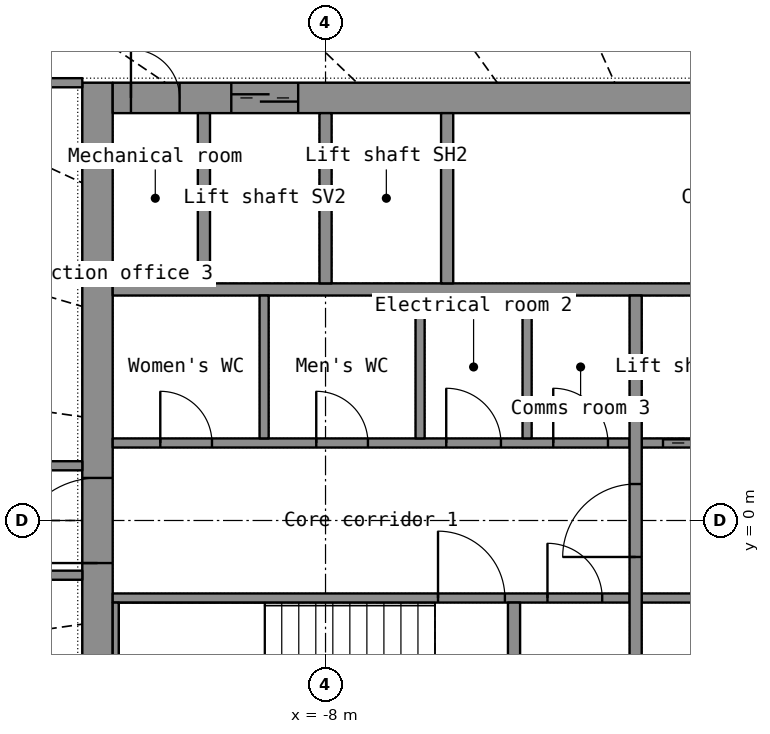
"""IFC4 building model, lengths in metres.
Left out: names, types, materials, properties, quantities, classifications, styles, units other than length and angle.
Written with IfcOpenShell. Run it as: python <this file> out.ifc"""

import sys

from ifc_helpers import new_model, si_unit, direction, frame, frame_2d, origin, place, context, subcontext, project, spatial, rectangle, extrude, element, fill, save


model = new_model("IFC4")
c1 = context("Model", 3, precision=1e-05, world=origin(), true_north=direction((0.0, 1.0)))
c2 = subcontext(c1, "Body", "Model", "MODEL_VIEW")
j1 = project(units=[si_unit("LENGTHUNIT", "METRE"), si_unit("PLANEANGLEUNIT", "RADIAN")], contexts=[c1])
p1 = place(None, origin())
s1 = spatial("IfcSite", under=j1, at=p1, CompositionType="ELEMENT")
p2 = place(p1, origin())
s2 = spatial("IfcBuilding", under=s1, at=p2, CompositionType="ELEMENT")
p3 = place(p2, frame((0.0, 0.0, 137.8)))
s3 = spatial("IfcBuildingStorey", under=s2, at=p3, CompositionType="ELEMENT", Elevation=137.8)
p4 = place(p3, frame((-11.75, -7.2, 0.0), z_axis=(0.0, 0.0, 1.0), x_axis=(0.0, 1.0, 0.0)))
e1 = element("IfcWall", 1, at=p4, inside=s3, PredefinedType="SHEAR", context=c2, shape_type="SweptSolid", body=[
    extrude(rectangle(XDim=14.4, YDim=0.5, at=frame_2d((7.2, 0.0))), origin(), (0.0, 0.0, 1.0), 3.3),
])
p5 = place(p4, frame((6.5, 0.0, 0.0)))
e2 = element("IfcOpeningElement", 2, at=p5, cuts=e1, PredefinedType="OPENING", context=c2, shape_type="SweptSolid", body=[
    extrude(rectangle(XDim=1.4, YDim=2.2, at=frame_2d((0.7, 1.1))), frame((0.0, 0.26, 0.0), z_axis=(0.0, -1.0, 0.0), x_axis=(1.0, 0.0, 0.0)), (0.0, 0.0, 1.0), 0.52),
])
p6 = place(p3, frame((-11.5, 6.95, 0.0), z_axis=(0.0, 0.0, 1.0), x_axis=(1.0, 0.0, 0.0)))
e3 = element("IfcWall", 3, at=p6, inside=s3, PredefinedType="SHEAR", context=c2, shape_type="SweptSolid", body=[
    extrude(rectangle(XDim=23.0, YDim=0.5, at=frame_2d((11.5, 0.0))), origin(), (0.0, 0.0, 1.0), 3.3),
])
p7 = place(p6, frame((1.95, 0.0, 0.0)))
e4 = element("IfcOpeningElement", 4, at=p7, cuts=e3, PredefinedType="OPENING", context=c2, shape_type="SweptSolid", body=[
    extrude(rectangle(XDim=1.1, YDim=2.2, at=frame_2d((0.55, 1.1))), frame((0.0, 0.26, 0.0), z_axis=(0.0, -1.0, 0.0), x_axis=(1.0, 0.0, 0.0)), (0.0, 0.0, 1.0), 0.52),
])
p8 = place(p6, frame((10.05, 0.0, 0.0)))
e5 = element("IfcOpeningElement", 5, at=p8, cuts=e3, PredefinedType="OPENING", context=c2, shape_type="SweptSolid", body=[
    extrude(rectangle(XDim=0.9, YDim=2.1, at=frame_2d((0.45, 1.05))), frame((0.0, 0.26, 0.0), z_axis=(0.0, -1.0, 0.0), x_axis=(1.0, 0.0, 0.0)), (0.0, 0.0, 1.0), 0.52),
])
p9 = place(p6, frame((18.05, 0.0, 0.0)))
e6 = element("IfcOpeningElement", 6, at=p9, cuts=e3, PredefinedType="OPENING", context=c2, shape_type="SweptSolid", body=[
    extrude(rectangle(XDim=0.9, YDim=2.1, at=frame_2d((0.45, 1.05))), frame((0.0, 0.26, 0.0), z_axis=(0.0, -1.0, 0.0), x_axis=(1.0, 0.0, 0.0)), (0.0, 0.0, 1.0), 0.52),
])
p10 = place(p6, frame((0.3, 0.0, 0.0)))
e7 = element("IfcOpeningElement", 7, at=p10, cuts=e3, PredefinedType="OPENING", context=c2, shape_type="SweptSolid", body=[
    extrude(rectangle(XDim=0.8, YDim=2.05, at=frame_2d((0.4, 1.025))), frame((0.0, 0.26, 0.0), z_axis=(0.0, -1.0, 0.0), x_axis=(1.0, 0.0, 0.0)), (0.0, 0.0, 1.0), 0.52),
])
p11 = place(p6, frame((21.9, 0.0, 0.0)))
e8 = element("IfcOpeningElement", 8, at=p11, cuts=e3, PredefinedType="OPENING", context=c2, shape_type="SweptSolid", body=[
    extrude(rectangle(XDim=0.8, YDim=2.05, at=frame_2d((0.4, 1.025))), frame((0.0, 0.26, 0.0), z_axis=(0.0, -1.0, 0.0), x_axis=(1.0, 0.0, 0.0)), (0.0, 0.0, 1.0), 0.52),
])
p12 = place(p3, frame((-11.5, 3.8, 0.0), z_axis=(0.0, 0.0, 1.0), x_axis=(1.0, 0.0, 0.0)))
e9 = element("IfcWall", 9, at=p12, inside=s3, PredefinedType="SHEAR", context=c2, shape_type="SweptSolid", body=[
    extrude(rectangle(XDim=23.0, YDim=0.2, at=frame_2d((11.5, 0.0))), origin(), (0.0, 0.0, 1.0), 3.3),
])
for number, where, z_axis, x_axis in (
    (10, (-10.0, 3.9, 0.0), (0.0, 0.0, 1.0), (0.0, 1.0, 0.0)),
    (11, (-8.0, 3.9, 0.0), (0.0, 0.0, 1.0), (0.0, 1.0, 0.0)),
    (12, (-6.0, 3.9, 0.0), (0.0, 0.0, 1.0), (0.0, 1.0, 0.0)),
):
    element("IfcWall", number, at=place(p3, frame(where, z_axis=z_axis, x_axis=x_axis)), inside=s3, PredefinedType="SHEAR", context=c2, shape_type="SweptSolid", body=[
        extrude(rectangle(XDim=2.8, YDim=0.2, at=frame_2d((1.4, 0.0))), origin(), (0.0, 0.0, 1.0), 3.3),
    ])
p13 = place(p3, frame((-11.5, -1.275, 0.0), z_axis=(0.0, 0.0, 1.0), x_axis=(1.0, 0.0, 0.0)))
e13 = element("IfcWall", 13, at=p13, inside=s3, PredefinedType="SHEAR", context=c2, shape_type="SweptSolid", body=[
    extrude(rectangle(XDim=8.5, YDim=0.15, at=frame_2d((4.25, 0.0))), origin(), (0.0, 0.0, 1.0), 3.3),
])
p14 = place(p13, frame((5.35, 0.0, 0.0)))
e14 = element("IfcOpeningElement", 14, at=p14, cuts=e13, PredefinedType="OPENING", context=c2, shape_type="SweptSolid", body=[
    extrude(rectangle(XDim=1.1, YDim=2.15, at=frame_2d((0.55, 1.075))), frame((0.0, 0.085, 0.0), z_axis=(0.0, -1.0, 0.0), x_axis=(1.0, 0.0, 0.0)), (0.0, 0.0, 1.0), 0.17),
])
p15 = place(p13, frame((7.15, 0.0, 0.0)))
e15 = element("IfcOpeningElement", 15, at=p15, cuts=e13, PredefinedType="OPENING", context=c2, shape_type="SweptSolid", body=[
    extrude(rectangle(XDim=0.9, YDim=2.1, at=frame_2d((0.45, 1.05))), frame((0.0, 0.085, 0.0), z_axis=(0.0, -1.0, 0.0), x_axis=(1.0, 0.0, 0.0)), (0.0, 0.0, 1.0), 0.17),
])
p16 = place(p3, frame((-2.8, -1.275, 0.0), z_axis=(0.0, 0.0, 1.0), x_axis=(1.0, 0.0, 0.0)))
e16 = element("IfcWall", 16, at=p16, inside=s3, PredefinedType="SHEAR", context=c2, shape_type="SweptSolid", body=[
    extrude(rectangle(XDim=5.6, YDim=0.15, at=frame_2d((2.8, 0.0))), origin(), (0.0, 0.0, 1.0), 3.3),
])
p17 = place(p16, frame((4.15, 0.0, 0.0)))
e17 = element("IfcOpeningElement", 17, at=p17, cuts=e16, PredefinedType="OPENING", context=c2, shape_type="SweptSolid", body=[
    extrude(rectangle(XDim=1.1, YDim=2.2, at=frame_2d((0.55, 1.1))), frame((0.0, 0.085, 0.0), z_axis=(0.0, -1.0, 0.0), x_axis=(1.0, 0.0, 0.0)), (0.0, 0.0, 1.0), 0.17),
])
p18 = place(p16, frame((1.35, 0.0, 0.0)))
e18 = element("IfcOpeningElement", 18, at=p18, cuts=e16, PredefinedType="OPENING", context=c2, shape_type="SweptSolid", body=[
    extrude(rectangle(XDim=0.9, YDim=2.1, at=frame_2d((0.45, 1.05))), frame((0.0, 0.085, 0.0), z_axis=(0.0, -1.0, 0.0), x_axis=(1.0, 0.0, 0.0)), (0.0, 0.0, 1.0), 0.17),
])
p19 = place(p3, frame((-11.5, 1.275, 0.0), z_axis=(0.0, 0.0, 1.0), x_axis=(1.0, 0.0, 0.0)))
e19 = element("IfcWall", 19, at=p19, inside=s3, PredefinedType="PARTITIONING", context=c2, shape_type="SweptSolid", body=[
    extrude(rectangle(XDim=8.5, YDim=0.15, at=frame_2d((4.25, 0.0))), origin(), (0.0, 0.0, 1.0), 3.3),
])
p20 = place(p19, frame((0.782, 0.0, 0.0)))
e20 = element("IfcOpeningElement", 20, at=p20, cuts=e19, PredefinedType="OPENING", context=c2, shape_type="SweptSolid", body=[
    extrude(rectangle(XDim=0.85, YDim=2.1, at=frame_2d((0.425, 1.05))), frame((0.0, 0.085, 0.0), z_axis=(0.0, -1.0, 0.0), x_axis=(1.0, 0.0, 0.0)), (0.0, 0.0, 1.0), 0.17),
])
p21 = place(p19, frame((3.347, 0.0, 0.0)))
e21 = element("IfcOpeningElement", 21, at=p21, cuts=e19, PredefinedType="OPENING", context=c2, shape_type="SweptSolid", body=[
    extrude(rectangle(XDim=0.85, YDim=2.1, at=frame_2d((0.425, 1.05))), frame((0.0, 0.085, 0.0), z_axis=(0.0, -1.0, 0.0), x_axis=(1.0, 0.0, 0.0)), (0.0, 0.0, 1.0), 0.17),
])
p22 = place(p19, frame((5.485, 0.0, 0.0)))
e22 = element("IfcOpeningElement", 22, at=p22, cuts=e19, PredefinedType="OPENING", context=c2, shape_type="SweptSolid", body=[
    extrude(rectangle(XDim=0.9, YDim=2.1, at=frame_2d((0.45, 1.05))), frame((0.0, 0.085, 0.0), z_axis=(0.0, -1.0, 0.0), x_axis=(1.0, 0.0, 0.0)), (0.0, 0.0, 1.0), 0.17),
])
p23 = place(p19, frame((7.245, 0.0, 0.0)))
e23 = element("IfcOpeningElement", 23, at=p23, cuts=e19, PredefinedType="OPENING", context=c2, shape_type="SweptSolid", body=[
    extrude(rectangle(XDim=0.9, YDim=2.1, at=frame_2d((0.45, 1.05))), frame((0.0, 0.085, 0.0), z_axis=(0.0, -1.0, 0.0), x_axis=(1.0, 0.0, 0.0)), (0.0, 0.0, 1.0), 0.17),
])
p24 = place(p3, frame((-2.8, 1.275, 0.0), z_axis=(0.0, 0.0, 1.0), x_axis=(1.0, 0.0, 0.0)))
e24 = element("IfcWall", 24, at=p24, inside=s3, PredefinedType="SHEAR", context=c2, shape_type="SweptSolid", body=[
    extrude(rectangle(XDim=5.6, YDim=0.15, at=frame_2d((2.8, 0.0))), origin(), (0.0, 0.0, 1.0), 3.3),
])
p25 = place(p24, frame((0.35, 0.0, 0.0)))
e25 = element("IfcOpeningElement", 25, at=p25, cuts=e24, PredefinedType="OPENING", context=c2, shape_type="SweptSolid", body=[
    extrude(rectangle(XDim=1.1, YDim=2.2, at=frame_2d((0.55, 1.1))), frame((0.0, 0.085, 0.0), z_axis=(0.0, -1.0, 0.0), x_axis=(1.0, 0.0, 0.0)), (0.0, 0.0, 1.0), 0.17),
])
p26 = place(p24, frame((2.326, 0.0, 0.0)))
e26 = element("IfcOpeningElement", 26, at=p26, cuts=e24, PredefinedType="OPENING", context=c2, shape_type="SweptSolid", body=[
    extrude(rectangle(XDim=0.9, YDim=2.1, at=frame_2d((0.45, 1.05))), frame((0.0, 0.085, 0.0), z_axis=(0.0, -1.0, 0.0), x_axis=(1.0, 0.0, 0.0)), (0.0, 0.0, 1.0), 0.17),
])
p27 = place(p24, frame((4.201, 0.0, 0.0)))
e27 = element("IfcOpeningElement", 27, at=p27, cuts=e24, PredefinedType="OPENING", context=c2, shape_type="SweptSolid", body=[
    extrude(rectangle(XDim=0.9, YDim=2.1, at=frame_2d((0.45, 1.05))), frame((0.0, 0.085, 0.0), z_axis=(0.0, -1.0, 0.0), x_axis=(1.0, 0.0, 0.0)), (0.0, 0.0, 1.0), 0.17),
])
p28 = place(p3, frame((-2.9, -3.7, 0.0), z_axis=(0.0, 0.0, 1.0), x_axis=(0.0, 1.0, 0.0)))
e28 = element("IfcWall", 28, at=p28, inside=s3, PredefinedType="SHEAR", context=c2, shape_type="SweptSolid", body=[
    extrude(rectangle(XDim=7.4, YDim=0.2, at=frame_2d((3.7, 0.0))), origin(), (0.0, 0.0, 1.0), 3.3),
])
p29 = place(p28, frame((3.1, 0.0, 0.0)))
e29 = element("IfcOpeningElement", 29, at=p29, cuts=e28, PredefinedType="OPENING", context=c2, shape_type="SweptSolid", body=[
    extrude(rectangle(XDim=1.2, YDim=2.2, at=frame_2d((0.6, 1.1))), frame((0.0, 0.11, 0.0), z_axis=(0.0, -1.0, 0.0), x_axis=(1.0, 0.0, 0.0)), (0.0, 0.0, 1.0), 0.22),
])
p30 = place(p3, frame((-11.45, -3.7, 0.0), z_axis=(0.0, 0.0, 1.0), x_axis=(0.0, 1.0, 0.0)))
e30 = element("IfcWall", 30, at=p30, inside=s3, PredefinedType="SHEAR", context=c2, shape_type="SweptSolid", body=[
    extrude(rectangle(XDim=2.35, YDim=0.1, at=frame_2d((1.175, 0.0))), origin(), (0.0, 0.0, 1.0), 3.3),
])
p31 = place(p3, frame((-4.9, -3.7, 0.0), z_axis=(0.0, 0.0, 1.0), x_axis=(0.0, 1.0, 0.0)))
e31 = element("IfcWall", 31, at=p31, inside=s3, PredefinedType="SHEAR", context=c2, shape_type="SweptSolid", body=[
    extrude(rectangle(XDim=2.35, YDim=0.2, at=frame_2d((1.175, 0.0))), origin(), (0.0, 0.0, 1.0), 3.3),
])
for number, where, z_axis, x_axis in (
    (32, (-9.01, 1.35, 0.0), (0.0, 0.0, 1.0), (0.0, 1.0, 0.0)),
    (33, (-6.445, 1.35, 0.0), (0.0, 0.0, 1.0), (0.0, 1.0, 0.0)),
    (34, (-4.685, 1.35, 0.0), (0.0, 0.0, 1.0), (0.0, 1.0, 0.0)),
):
    element("IfcWall", number, at=place(p3, frame(where, z_axis=z_axis, x_axis=x_axis)), inside=s3, PredefinedType="PARTITIONING", context=c2, shape_type="SweptSolid", body=[
        extrude(rectangle(XDim=2.35, YDim=0.15, at=frame_2d((1.175, 0.0))), origin(), (0.0, 0.0, 1.0), 3.3),
    ])
for number, where, z_axis, x_axis in (
    (35, (-15.923, 7.2, 0.0), (0.0, 0.0, 1.0), (1.0, 0.0, 0.0)),
    (36, (-12.0, 0.9, 0.0), (0.0, 0.0, 1.0), (-1.0, 0.0, 0.0)),
):
    element("IfcWall", number, at=place(p3, frame(where, z_axis=z_axis, x_axis=x_axis)), inside=s3, PredefinedType="PARTITIONING", context=c2, shape_type="SweptSolid", body=[
        extrude(rectangle(XDim=3.923, YDim=0.15, at=frame_2d((1.961, 0.0))), origin(), (0.0, 0.0, 1.0), 2.4),
    ])
p32 = place(p3, frame((-12.559, -0.9, 0.0), z_axis=(0.0, 0.0, 1.0), x_axis=(1.0, 0.0, 0.0)))
e37 = element("IfcWall", 37, at=p32, inside=s3, PredefinedType="PARTITIONING", context=c2, shape_type="SweptSolid", body=[
    extrude(rectangle(XDim=0.559, YDim=0.15, at=frame_2d((0.279, 0.0))), origin(), (0.0, 0.0, 1.0), 2.4),
])
p33 = place(p7, origin())
e38 = element("IfcDoor", 38, at=p33, inside=s3, OperationType="DOUBLE_DOOR_SLIDING", PredefinedType="DOOR", context=c2, shape_type="SweptSolid", body=[
    extrude(rectangle(XDim=1.1, YDim=2.2, at=frame_2d((0.55, 1.1))), frame((0.0, 0.025, 0.0), z_axis=(0.0, -1.0, 0.0), x_axis=(1.0, 0.0, 0.0)), (0.0, 0.0, 1.0), 0.05),
])
fill(e4, e38)
p34 = place(p10, origin())
e39 = element("IfcDoor", 39, at=p34, inside=s3, OperationType="SINGLE_SWING_LEFT", PredefinedType="DOOR", context=c2, shape_type="SweptSolid", body=[
    extrude(rectangle(XDim=0.8, YDim=2.05, at=frame_2d((0.4, 1.025))), frame((0.0, 0.025, 0.0), z_axis=(0.0, -1.0, 0.0), x_axis=(1.0, 0.0, 0.0)), (0.0, 0.0, 1.0), 0.05),
])
fill(e7, e39)
p35 = place(p5, origin())
e40 = element("IfcDoor", 40, at=p35, inside=s3, OperationType="DOUBLE_DOOR_SINGLE_SWING", PredefinedType="DOOR", context=c2, shape_type="SweptSolid", body=[
    extrude(rectangle(XDim=1.4, YDim=2.2, at=frame_2d((0.7, 1.1))), frame((0.0, 0.025, 0.0), z_axis=(0.0, -1.0, 0.0), x_axis=(1.0, 0.0, 0.0)), (0.0, 0.0, 1.0), 0.05),
])
fill(e2, e40)
p36 = place(p29, origin())
e41 = element("IfcDoor", 41, at=p36, inside=s3, OperationType="SINGLE_SWING_LEFT", PredefinedType="DOOR", context=c2, shape_type="SweptSolid", body=[
    extrude(rectangle(XDim=1.2, YDim=2.2, at=frame_2d((0.6, 1.1))), frame((0.0, 0.025, 0.0), z_axis=(0.0, -1.0, 0.0), x_axis=(1.0, 0.0, 0.0)), (0.0, 0.0, 1.0), 0.05),
])
fill(e29, e41)
p37 = place(p25, origin())
e42 = element("IfcDoor", 42, at=p37, inside=s3, OperationType="DOUBLE_DOOR_SLIDING", PredefinedType="DOOR", context=c2, shape_type="SweptSolid", body=[
    extrude(rectangle(XDim=1.1, YDim=2.2, at=frame_2d((0.55, 1.1))), frame((0.0, 0.025, 0.0), z_axis=(0.0, -1.0, 0.0), x_axis=(1.0, 0.0, 0.0)), (0.0, 0.0, 1.0), 0.05),
])
fill(e25, e42)
p38 = place(p14, origin())
e43 = element("IfcDoor", 43, at=p38, inside=s3, OperationType="SINGLE_SWING_LEFT", PredefinedType="DOOR", context=c2, shape_type="SweptSolid", body=[
    extrude(rectangle(XDim=1.1, YDim=2.15, at=frame_2d((0.55, 1.075))), frame((0.0, 0.025, 0.0), z_axis=(0.0, -1.0, 0.0), x_axis=(1.0, 0.0, 0.0)), (0.0, 0.0, 1.0), 0.05),
])
fill(e14, e43)
p39 = place(p20, origin())
e44 = element("IfcDoor", 44, at=p39, inside=s3, OperationType="SINGLE_SWING_LEFT", PredefinedType="DOOR", context=c2, shape_type="SweptSolid", body=[
    extrude(rectangle(XDim=0.85, YDim=2.1, at=frame_2d((0.425, 1.05))), frame((0.0, 0.025, 0.0), z_axis=(0.0, -1.0, 0.0), x_axis=(1.0, 0.0, 0.0)), (0.0, 0.0, 1.0), 0.05),
])
fill(e20, e44)
p40 = place(p21, origin())
e45 = element("IfcDoor", 45, at=p40, inside=s3, OperationType="SINGLE_SWING_LEFT", PredefinedType="DOOR", context=c2, shape_type="SweptSolid", body=[
    extrude(rectangle(XDim=0.85, YDim=2.1, at=frame_2d((0.425, 1.05))), frame((0.0, 0.025, 0.0), z_axis=(0.0, -1.0, 0.0), x_axis=(1.0, 0.0, 0.0)), (0.0, 0.0, 1.0), 0.05),
])
fill(e21, e45)
p41 = place(p22, origin())
e46 = element("IfcDoor", 46, at=p41, inside=s3, OperationType="SINGLE_SWING_LEFT", PredefinedType="DOOR", context=c2, shape_type="SweptSolid", body=[
    extrude(rectangle(XDim=0.9, YDim=2.1, at=frame_2d((0.45, 1.05))), frame((0.0, 0.025, 0.0), z_axis=(0.0, -1.0, 0.0), x_axis=(1.0, 0.0, 0.0)), (0.0, 0.0, 1.0), 0.05),
])
fill(e22, e46)
p42 = place(p23, origin())
e47 = element("IfcDoor", 47, at=p42, inside=s3, OperationType="SINGLE_SWING_LEFT", PredefinedType="DOOR", context=c2, shape_type="SweptSolid", body=[
    extrude(rectangle(XDim=0.9, YDim=2.1, at=frame_2d((0.45, 1.05))), frame((0.0, 0.025, 0.0), z_axis=(0.0, -1.0, 0.0), x_axis=(1.0, 0.0, 0.0)), (0.0, 0.0, 1.0), 0.05),
])
fill(e23, e47)
p43 = place(p15, origin())
e48 = element("IfcDoor", 48, at=p43, inside=s3, OperationType="SINGLE_SWING_LEFT", PredefinedType="DOOR", context=c2, shape_type="SweptSolid", body=[
    extrude(rectangle(XDim=0.9, YDim=2.1, at=frame_2d((0.45, 1.05))), frame((0.0, 0.025, 0.0), z_axis=(0.0, -1.0, 0.0), x_axis=(1.0, 0.0, 0.0)), (0.0, 0.0, 1.0), 0.05),
])
fill(e15, e48)
save(model, sys.argv[1])
